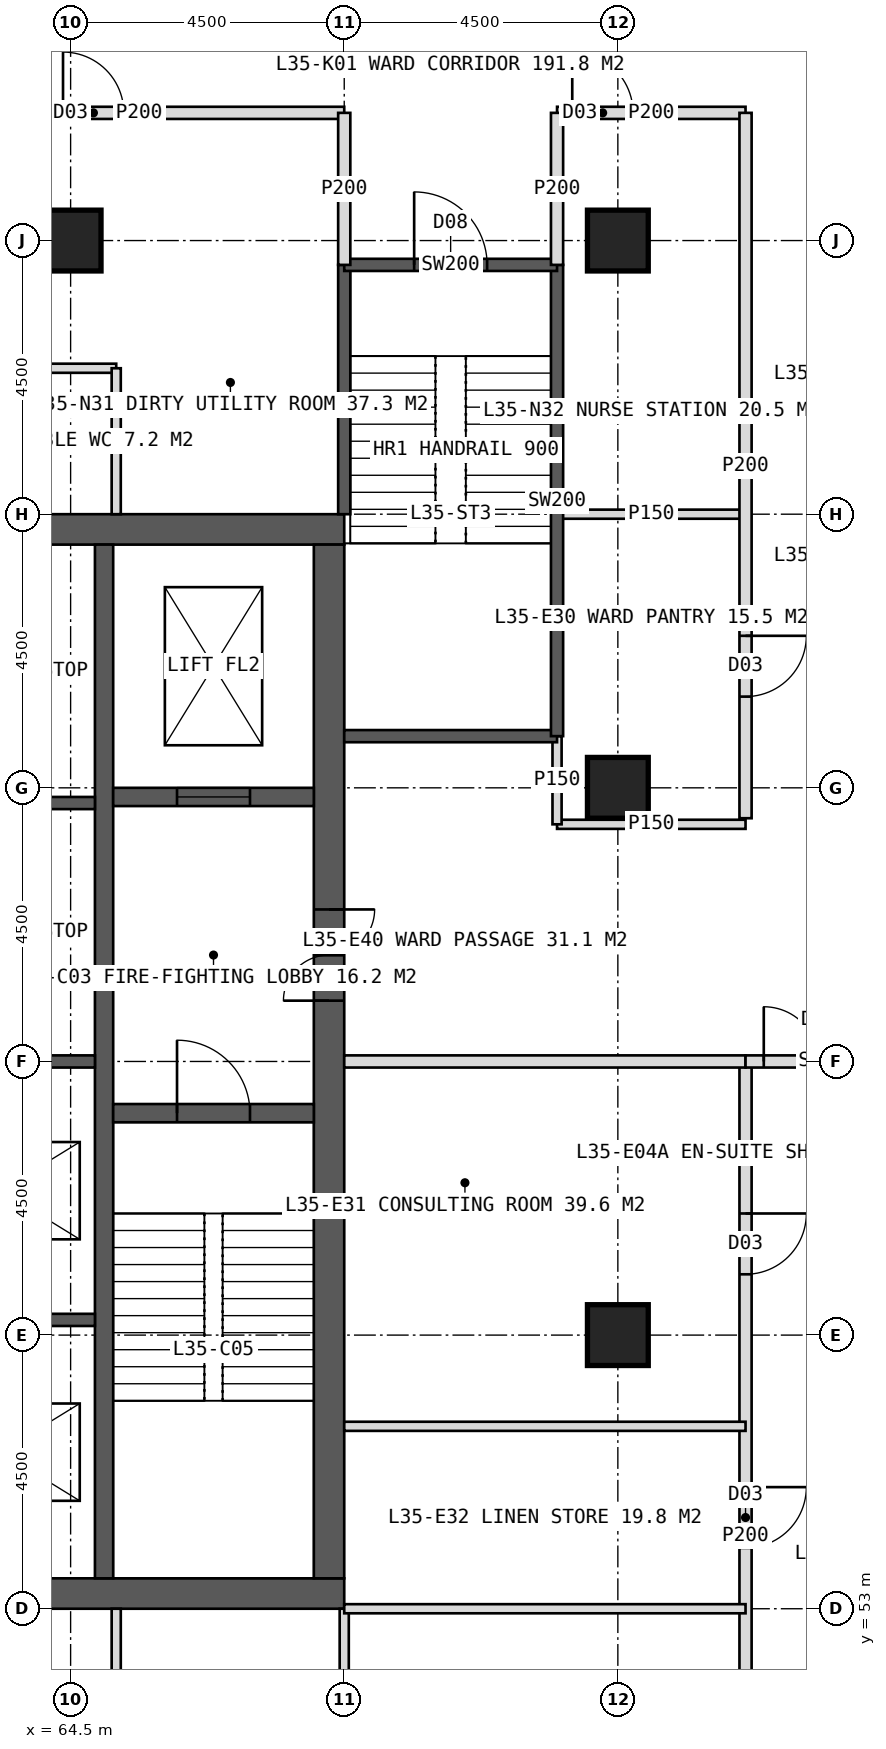
"""IFC4 building model, lengths in metres.
Left out: names, types, materials, properties, quantities, classifications, styles, units other than length and angle.
Written with IfcOpenShell. Run it as: python <this file> out.ifc"""

import sys

from ifc_helpers import new_model, si_unit, direction, frame, frame_2d, origin, origin_2d, place, context, subcontext, project, spatial, rectangle, hollow_rectangle, extrude, element, fill, save


model = new_model("IFC4")
c1 = context("Model", 3, precision=1e-05, world=origin(), true_north=direction((0.0, 1.0)))
c2 = subcontext(c1, "Body", "Model", "MODEL_VIEW")
j1 = project(units=[si_unit("LENGTHUNIT", "METRE"), si_unit("PLANEANGLEUNIT", "RADIAN")], contexts=[c1])
p1 = place(None, origin())
s1 = spatial("IfcSite", under=j1, at=p1, CompositionType="ELEMENT")
p2 = place(p1, origin())
s2 = spatial("IfcBuilding", under=s1, at=p2, CompositionType="ELEMENT")
p3 = place(p2, frame((0.0, 0.0, 148.0)))
s3 = spatial("IfcBuildingStorey", under=s2, at=p3, CompositionType="ELEMENT", Elevation=148.0)
p4 = place(p3, frame((51.0, 70.75, 0.0), z_axis=(0.0, 0.0, 1.0), x_axis=(1.0, 0.0, 0.0)))
e1 = element("IfcWall", 1, at=p4, inside=s3, PredefinedType="SHEAR", context=c2, shape_type="SweptSolid", body=[
    extrude(rectangle(XDim=18.0, YDim=0.5, at=frame_2d((9.0, 0.0))), origin(), (0.0, 0.0, 1.0), 4.0),
])
p5 = place(p4, frame((8.1, 0.0, 0.0)))
e2 = element("IfcOpeningElement", 2, at=p5, cuts=e1, PredefinedType="OPENING", context=c2, shape_type="SweptSolid", body=[
    extrude(rectangle(XDim=1.8, YDim=2.2, at=frame_2d((0.9, 1.1))), frame((0.0, 0.26, 0.0), z_axis=(0.0, -1.0, 0.0), x_axis=(1.0, 0.0, 0.0)), (0.0, 0.0, 1.0), 0.52),
])
p6 = place(p3, frame((51.0, 53.25, 0.0), z_axis=(0.0, 0.0, 1.0), x_axis=(1.0, 0.0, 0.0)))
e3 = element("IfcWall", 3, at=p6, inside=s3, PredefinedType="SHEAR", context=c2, shape_type="SweptSolid", body=[
    extrude(rectangle(XDim=18.0, YDim=0.5, at=frame_2d((9.0, 0.0))), origin(), (0.0, 0.0, 1.0), 4.0),
])
p7 = place(p6, frame((8.1, 0.0, 0.0)))
e4 = element("IfcOpeningElement", 4, at=p7, cuts=e3, PredefinedType="OPENING", context=c2, shape_type="SweptSolid", body=[
    extrude(rectangle(XDim=1.8, YDim=2.2, at=frame_2d((0.9, 1.1))), frame((0.0, 0.26, 0.0), z_axis=(0.0, -1.0, 0.0), x_axis=(1.0, 0.0, 0.0)), (0.0, 0.0, 1.0), 0.52),
])
p8 = place(p3, frame((68.75, 53.5, 0.0), z_axis=(0.0, 0.0, 1.0), x_axis=(0.0, 1.0, 0.0)))
e5 = element("IfcWall", 5, at=p8, inside=s3, PredefinedType="SHEAR", context=c2, shape_type="SweptSolid", body=[
    extrude(rectangle(XDim=17.0, YDim=0.5, at=frame_2d((8.5, 0.0))), origin(), (0.0, 0.0, 1.0), 4.0),
])
p9 = place(p8, frame((9.5, 0.0, 0.0)))
e6 = element("IfcOpeningElement", 6, at=p9, cuts=e5, PredefinedType="OPENING", context=c2, shape_type="SweptSolid", body=[
    extrude(rectangle(XDim=1.5, YDim=2.2, at=frame_2d((0.75, 1.1))), frame((0.0, 0.26, 0.0), z_axis=(0.0, -1.0, 0.0), x_axis=(1.0, 0.0, 0.0)), (0.0, 0.0, 1.0), 0.52),
])
p10 = place(p3, frame((65.05, 53.5, 0.0), z_axis=(0.0, 0.0, 1.0), x_axis=(0.0, 1.0, 0.0)))
e7 = element("IfcWall", 7, at=p10, inside=s3, PredefinedType="SHEAR", context=c2, shape_type="SweptSolid", body=[
    extrude(rectangle(XDim=17.0, YDim=0.3, at=frame_2d((8.5, 0.0))), origin(), (0.0, 0.0, 1.0), 4.0),
])
for number, where, z_axis, x_axis in (
    (8, (61.85, 57.75, 0.0), (0.0, 0.0, 1.0), (1.0, 0.0, 0.0)),
    (9, (61.85, 62.0, 0.0), (0.0, 0.0, 1.0), (1.0, 0.0, 0.0)),
    (10, (61.85, 66.25, 0.0), (0.0, 0.0, 1.0), (1.0, 0.0, 0.0)),
):
    element("IfcWall", number, at=place(p3, frame(where, z_axis=z_axis, x_axis=x_axis)), inside=s3, PredefinedType="SHEAR", context=c2, shape_type="SweptSolid", body=[
        extrude(rectangle(XDim=3.05, YDim=0.2, at=frame_2d((1.525, 0.0))), origin(), (0.0, 0.0, 1.0), 4.0),
    ])
p11 = place(p3, frame((65.2, 61.15, 0.0), z_axis=(0.0, 0.0, 1.0), x_axis=(1.0, 0.0, 0.0)))
e11 = element("IfcWall", 11, at=p11, inside=s3, PredefinedType="SHEAR", context=c2, shape_type="SweptSolid", body=[
    extrude(rectangle(XDim=3.3, YDim=0.3, at=frame_2d((1.65, 0.0))), origin(), (0.0, 0.0, 1.0), 4.0),
])
p12 = place(p11, frame((1.05, 0.0, 0.0)))
e12 = element("IfcOpeningElement", 12, at=p12, cuts=e11, PredefinedType="OPENING", context=c2, shape_type="SweptSolid", body=[
    extrude(rectangle(XDim=1.2, YDim=2.1, at=frame_2d((0.6, 1.05))), frame((0.0, 0.16, 0.0), z_axis=(0.0, -1.0, 0.0), x_axis=(1.0, 0.0, 0.0)), (0.0, 0.0, 1.0), 0.32),
])
p13 = place(p3, frame((65.2, 66.35, 0.0), z_axis=(0.0, 0.0, 1.0), x_axis=(1.0, 0.0, 0.0)))
e13 = element("IfcWall", 13, at=p13, inside=s3, PredefinedType="SHEAR", context=c2, shape_type="SweptSolid", body=[
    extrude(rectangle(XDim=3.3, YDim=0.3, at=frame_2d((1.65, 0.0))), origin(), (0.0, 0.0, 1.0), 4.0),
])
p14 = place(p13, frame((1.05, 0.0, 0.0)))
e14 = element("IfcOpeningElement", 14, at=p14, cuts=e13, PredefinedType="OPENING", context=c2, shape_type="SweptSolid", body=[
    extrude(rectangle(XDim=1.2, YDim=2.2, at=frame_2d((0.6, 1.1))), frame((0.0, 0.16, 0.0), z_axis=(0.0, -1.0, 0.0), x_axis=(1.0, 0.0, 0.0)), (0.0, 0.0, 1.0), 0.32),
])
for number, where, z_axis, x_axis in (
    (15, (73.5, 75.5, 0.0), (0.0, 0.0, 1.0), (1.0, 0.0, 0.0)),
    (16, (64.5, 75.5, 0.0), (0.0, 0.0, 1.0), (1.0, 0.0, 0.0)),
    (17, (73.5, 57.5, 0.0), (0.0, 0.0, 1.0), (1.0, 0.0, 0.0)),
    (18, (73.5, 66.5, 0.0), (0.0, 0.0, 1.0), (1.0, 0.0, 0.0)),
):
    element("IfcColumn", number, at=place(p3, frame(where, z_axis=z_axis, x_axis=x_axis)), inside=s3, PredefinedType="COLUMN", context=c2, shape_type="SweptSolid", body=[
        extrude(hollow_rectangle(XDim=1.0, YDim=1.0, WallThickness=0.1, at=origin_2d()), origin(), (0.0, 0.0, 1.0), 4.0),
    ])
p15 = place(p3, frame((62.25, 77.6, 0.0), z_axis=(0.0, 0.0, 1.0), x_axis=(1.0, 0.0, 0.0)))
e19 = element("IfcWall", 19, at=p15, inside=s3, PredefinedType="PARTITIONING", context=c2, shape_type="SweptSolid", body=[
    extrude(rectangle(XDim=6.75, YDim=0.2, at=frame_2d((3.375, 0.0))), origin(), (0.0, 0.0, 1.0), 3.75),
])
p16 = place(p15, frame((2.125, 0.0, 0.0)))
e20 = element("IfcOpeningElement", 20, at=p16, cuts=e19, PredefinedType="OPENING", context=c2, shape_type="SweptSolid", body=[
    extrude(rectangle(XDim=1.0, YDim=2.1, at=frame_2d((0.5, 1.05))), frame((0.0, 0.11, 0.0), z_axis=(0.0, -1.0, 0.0), x_axis=(1.0, 0.0, 0.0)), (0.0, 0.0, 1.0), 0.22),
])
p17 = place(p3, frame((72.5, 77.6, 0.0), z_axis=(0.0, 0.0, 1.0), x_axis=(1.0, 0.0, 0.0)))
e21 = element("IfcWall", 21, at=p17, inside=s3, PredefinedType="PARTITIONING", context=c2, shape_type="SweptSolid", body=[
    extrude(rectangle(XDim=3.1, YDim=0.2, at=frame_2d((1.55, 0.0))), origin(), (0.0, 0.0, 1.0), 3.75),
])
p18 = place(p17, frame((0.25, 0.0, 0.0)))
e22 = element("IfcOpeningElement", 22, at=p18, cuts=e21, PredefinedType="OPENING", context=c2, shape_type="SweptSolid", body=[
    extrude(rectangle(XDim=1.0, YDim=2.1, at=frame_2d((0.5, 1.05))), frame((0.0, 0.11, 0.0), z_axis=(0.0, -1.0, 0.0), x_axis=(1.0, 0.0, 0.0)), (0.0, 0.0, 1.0), 0.22),
])
p19 = place(p3, frame((62.25, 73.4, 0.0), z_axis=(0.0, 0.0, 1.0), x_axis=(1.0, 0.0, 0.0)))
e23 = element("IfcWall", 23, at=p19, inside=s3, PredefinedType="PARTITIONING", context=c2, shape_type="SweptSolid", body=[
    extrude(rectangle(XDim=3.0, YDim=0.15, at=frame_2d((1.5, 0.0))), origin(), (0.0, 0.0, 1.0), 3.75),
])
p20 = place(p3, frame((65.25, 71.0, 0.0), z_axis=(0.0, 0.0, 1.0), x_axis=(0.0, 1.0, 0.0)))
e24 = element("IfcWall", 24, at=p20, inside=s3, PredefinedType="PARTITIONING", context=c2, shape_type="SweptSolid", body=[
    extrude(rectangle(XDim=2.4, YDim=0.15, at=frame_2d((1.2, 0.0))), origin(), (0.0, 0.0, 1.0), 3.75),
])
p21 = place(p3, frame((69.0, 53.0, 0.0), z_axis=(0.0, 0.0, 1.0), x_axis=(0.0, -1.0, 0.0)))
e25 = element("IfcWall", 25, at=p21, inside=s3, PredefinedType="PARTITIONING", context=c2, shape_type="SweptSolid", body=[
    extrude(rectangle(XDim=6.6, YDim=0.15, at=frame_2d((3.3, 0.0))), origin(), (0.0, 0.0, 1.0), 3.75),
])
p22 = place(p3, frame((65.25, 53.0, 0.0), z_axis=(0.0, 0.0, 1.0), x_axis=(0.0, -1.0, 0.0)))
e26 = element("IfcWall", 26, at=p22, inside=s3, PredefinedType="PARTITIONING", context=c2, shape_type="SweptSolid", body=[
    extrude(rectangle(XDim=2.4, YDim=0.15, at=frame_2d((1.2, 0.0))), origin(), (0.0, 0.0, 1.0), 3.75),
])
p23 = place(p3, frame((72.5, 71.0, 0.0), z_axis=(0.0, 0.0, 1.0), x_axis=(1.0, 0.0, 0.0)))
e27 = element("IfcWall", 27, at=p23, inside=s3, PredefinedType="PARTITIONING", context=c2, shape_type="SweptSolid", body=[
    extrude(rectangle(XDim=3.1, YDim=0.15, at=frame_2d((1.55, 0.0))), origin(), (0.0, 0.0, 1.0), 3.75),
])
p24 = place(p3, frame((75.6, 77.6, 0.0), z_axis=(0.0, 0.0, 1.0), x_axis=(0.0, -1.0, 0.0)))
e28 = element("IfcWall", 28, at=p24, inside=s3, PredefinedType="PARTITIONING", context=c2, shape_type="SweptSolid", body=[
    extrude(rectangle(XDim=11.6, YDim=0.2, at=frame_2d((5.8, 0.0))), origin(), (0.0, 0.0, 1.0), 3.75),
])
p25 = place(p24, frame((8.6, 0.0, 0.0)))
e29 = element("IfcOpeningElement", 29, at=p25, cuts=e28, PredefinedType="OPENING", context=c2, shape_type="SweptSolid", body=[
    extrude(rectangle(XDim=1.0, YDim=2.1, at=frame_2d((0.5, 1.05))), frame((0.0, 0.11, 0.0), z_axis=(0.0, -1.0, 0.0), x_axis=(1.0, 0.0, 0.0)), (0.0, 0.0, 1.0), 0.22),
])
p26 = place(p3, frame((75.6, 62.0, 0.0), z_axis=(0.0, 0.0, 1.0), x_axis=(0.0, -1.0, 0.0)))
e30 = element("IfcWall", 30, at=p26, inside=s3, PredefinedType="PARTITIONING", context=c2, shape_type="SweptSolid", body=[
    extrude(rectangle(XDim=15.6, YDim=0.2, at=frame_2d((7.8, 0.0))), origin(), (0.0, 0.0, 1.0), 3.75),
])
p27 = place(p26, frame((2.5, 0.0, 0.0)))
e31 = element("IfcOpeningElement", 31, at=p27, cuts=e30, PredefinedType="OPENING", context=c2, shape_type="SweptSolid", body=[
    extrude(rectangle(XDim=1.0, YDim=2.1, at=frame_2d((0.5, 1.05))), frame((0.0, 0.11, 0.0), z_axis=(0.0, -1.0, 0.0), x_axis=(1.0, 0.0, 0.0)), (0.0, 0.0, 1.0), 0.22),
])
p28 = place(p26, frame((7.0, 0.0, 0.0)))
e32 = element("IfcOpeningElement", 32, at=p28, cuts=e30, PredefinedType="OPENING", context=c2, shape_type="SweptSolid", body=[
    extrude(rectangle(XDim=1.0, YDim=2.1, at=frame_2d((0.5, 1.05))), frame((0.0, 0.11, 0.0), z_axis=(0.0, -1.0, 0.0), x_axis=(1.0, 0.0, 0.0)), (0.0, 0.0, 1.0), 0.22),
])
p29 = place(p26, frame((11.8, 0.0, 0.0)))
e33 = element("IfcOpeningElement", 33, at=p29, cuts=e30, PredefinedType="OPENING", context=c2, shape_type="SweptSolid", body=[
    extrude(rectangle(XDim=1.0, YDim=2.1, at=frame_2d((0.5, 1.05))), frame((0.0, 0.11, 0.0), z_axis=(0.0, -1.0, 0.0), x_axis=(1.0, 0.0, 0.0)), (0.0, 0.0, 1.0), 0.22),
])
p30 = place(p3, frame((72.5, 65.9, 0.0), z_axis=(0.0, 0.0, 1.0), x_axis=(1.0, 0.0, 0.0)))
e34 = element("IfcWall", 34, at=p30, inside=s3, PredefinedType="PARTITIONING", context=c2, shape_type="SweptSolid", body=[
    extrude(rectangle(XDim=3.1, YDim=0.15, at=frame_2d((1.55, 0.0))), origin(), (0.0, 0.0, 1.0), 3.75),
])
p31 = place(p3, frame((69.0, 62.0, 0.0), z_axis=(0.0, 0.0, 1.0), x_axis=(1.0, 0.0, 0.0)))
e35 = element("IfcWall", 35, at=p31, inside=s3, PredefinedType="SOLIDWALL", context=c2, shape_type="SweptSolid", body=[
    extrude(rectangle(XDim=6.6, YDim=0.2, at=frame_2d((3.3, 0.0))), origin(), (0.0, 0.0, 1.0), 2.95),
])
for number, where, z_axis, x_axis in (
    (36, (69.0, 56.0, 0.0), (0.0, 0.0, 1.0), (1.0, 0.0, 0.0)),
    (37, (69.0, 53.0, 0.0), (0.0, 0.0, 1.0), (1.0, 0.0, 0.0)),
):
    element("IfcWall", number, at=place(p3, frame(where, z_axis=z_axis, x_axis=x_axis)), inside=s3, PredefinedType="PARTITIONING", context=c2, shape_type="SweptSolid", body=[
        extrude(rectangle(XDim=6.6, YDim=0.15, at=frame_2d((3.3, 0.0))), origin(), (0.0, 0.0, 1.0), 3.75),
    ])
p32 = place(p3, frame((75.6, 62.0, 0.0), z_axis=(0.0, 0.0, 1.0), x_axis=(1.0, 0.0, 0.0)))
e38 = element("IfcWall", 38, at=p32, inside=s3, PredefinedType="SOLIDWALL", context=c2, shape_type="SweptSolid", body=[
    extrude(rectangle(XDim=2.7, YDim=0.2, at=frame_2d((1.35, 0.0))), origin(), (0.0, 0.0, 1.0), 2.95),
])
p33 = place(p32, frame((0.3, 0.0, 0.0)))
e39 = element("IfcOpeningElement", 39, at=p33, cuts=e38, PredefinedType="OPENING", context=c2, shape_type="SweptSolid", body=[
    extrude(rectangle(XDim=1.8, YDim=2.2, at=frame_2d((0.9, 1.1))), frame((0.0, 0.11, 0.0), z_axis=(0.0, -1.0, 0.0), x_axis=(1.0, 0.0, 0.0)), (0.0, 0.0, 1.0), 0.22),
])
p34 = place(p3, frame((72.5, 65.9, 0.0), z_axis=(0.0, 0.0, 1.0), x_axis=(0.0, 1.0, 0.0)))
e40 = element("IfcWall", 40, at=p34, inside=s3, PredefinedType="PARTITIONING", context=c2, shape_type="SweptSolid", body=[
    extrude(rectangle(XDim=1.45, YDim=0.15, at=frame_2d((0.725, 0.0))), origin(), (0.0, 0.0, 1.0), 3.75),
])
p35 = place(p3, frame((69.0, 71.0, 0.0), z_axis=(0.0, 0.0, 1.0), x_axis=(0.0, 1.0, 0.0)))
e41 = element("IfcWall", 41, at=p35, inside=s3, PredefinedType="SOLIDWALL", context=c2, shape_type="SweptSolid", body=[
    extrude(rectangle(XDim=4.1, YDim=0.2, at=frame_2d((2.05, 0.0))), origin(), (0.0, 0.0, 1.0), 3.75),
])
p36 = place(p3, frame((69.0, 67.35, 0.0), z_axis=(0.0, 0.0, 1.0), x_axis=(1.0, 0.0, 0.0)))
e42 = element("IfcWall", 42, at=p36, inside=s3, PredefinedType="SOLIDWALL", context=c2, shape_type="SweptSolid", body=[
    extrude(rectangle(XDim=3.5, YDim=0.2, at=frame_2d((1.75, 0.0))), origin(), (0.0, 0.0, 1.0), 3.75),
])
p37 = place(p3, frame((72.5, 67.35, 0.0), z_axis=(0.0, 0.0, 1.0), x_axis=(0.0, 1.0, 0.0)))
e43 = element("IfcWall", 43, at=p37, inside=s3, PredefinedType="SOLIDWALL", context=c2, shape_type="SweptSolid", body=[
    extrude(rectangle(XDim=7.75, YDim=0.2, at=frame_2d((3.875, 0.0))), origin(), (0.0, 0.0, 1.0), 3.75),
])
p38 = place(p3, frame((69.0, 75.1, 0.0), z_axis=(0.0, 0.0, 1.0), x_axis=(1.0, 0.0, 0.0)))
e44 = element("IfcWall", 44, at=p38, inside=s3, PredefinedType="SOLIDWALL", context=c2, shape_type="SweptSolid", body=[
    extrude(rectangle(XDim=3.5, YDim=0.2, at=frame_2d((1.75, 0.0))), origin(), (0.0, 0.0, 1.0), 3.75),
])
p39 = place(p38, frame((1.15, 0.0, 0.0)))
e45 = element("IfcOpeningElement", 45, at=p39, cuts=e44, PredefinedType="OPENING", context=c2, shape_type="SweptSolid", body=[
    extrude(rectangle(XDim=1.2, YDim=2.1, at=frame_2d((0.6, 1.05))), frame((0.0, 0.11, 0.0), z_axis=(0.0, -1.0, 0.0), x_axis=(1.0, 0.0, 0.0)), (0.0, 0.0, 1.0), 0.22),
])
for number, where, z_axis, x_axis in (
    (46, (69.0, 75.1, 0.0), (0.0, 0.0, 1.0), (0.0, 1.0, 0.0)),
    (47, (72.5, 75.1, 0.0), (0.0, 0.0, 1.0), (0.0, 1.0, 0.0)),
):
    element("IfcWall", number, at=place(p3, frame(where, z_axis=z_axis, x_axis=x_axis)), inside=s3, PredefinedType="PARTITIONING", context=c2, shape_type="SweptSolid", body=[
        extrude(rectangle(XDim=2.5, YDim=0.2, at=frame_2d((1.25, 0.0))), origin(), (0.0, 0.0, 1.0), 3.75),
    ])
p40 = place(p16, origin())
e48 = element("IfcDoor", 48, at=p40, inside=s3, OperationType="SINGLE_SWING_LEFT", PredefinedType="DOOR", context=c2, shape_type="SweptSolid", body=[
    extrude(rectangle(XDim=1.0, YDim=2.1, at=frame_2d((0.5, 1.05))), frame((0.0, 0.025, 0.0), z_axis=(0.0, -1.0, 0.0), x_axis=(1.0, 0.0, 0.0)), (0.0, 0.0, 1.0), 0.05),
])
fill(e20, e48)
p41 = place(p18, origin())
e49 = element("IfcDoor", 49, at=p41, inside=s3, OperationType="SINGLE_SWING_LEFT", PredefinedType="DOOR", context=c2, shape_type="SweptSolid", body=[
    extrude(rectangle(XDim=1.0, YDim=2.1, at=frame_2d((0.5, 1.05))), frame((0.0, 0.025, 0.0), z_axis=(0.0, -1.0, 0.0), x_axis=(1.0, 0.0, 0.0)), (0.0, 0.0, 1.0), 0.05),
])
fill(e22, e49)
p42 = place(p25, origin())
e50 = element("IfcDoor", 50, at=p42, inside=s3, OperationType="SINGLE_SWING_LEFT", PredefinedType="DOOR", context=c2, shape_type="SweptSolid", body=[
    extrude(rectangle(XDim=1.0, YDim=2.1, at=frame_2d((0.5, 1.05))), frame((0.0, 0.025, 0.0), z_axis=(0.0, -1.0, 0.0), x_axis=(1.0, 0.0, 0.0)), (0.0, 0.0, 1.0), 0.05),
])
fill(e29, e50)
p43 = place(p27, origin())
e51 = element("IfcDoor", 51, at=p43, inside=s3, OperationType="SINGLE_SWING_LEFT", PredefinedType="DOOR", context=c2, shape_type="SweptSolid", body=[
    extrude(rectangle(XDim=1.0, YDim=2.1, at=frame_2d((0.5, 1.05))), frame((0.0, 0.025, 0.0), z_axis=(0.0, -1.0, 0.0), x_axis=(1.0, 0.0, 0.0)), (0.0, 0.0, 1.0), 0.05),
])
fill(e31, e51)
p44 = place(p28, origin())
e52 = element("IfcDoor", 52, at=p44, inside=s3, OperationType="SINGLE_SWING_LEFT", PredefinedType="DOOR", context=c2, shape_type="SweptSolid", body=[
    extrude(rectangle(XDim=1.0, YDim=2.1, at=frame_2d((0.5, 1.05))), frame((0.0, 0.025, 0.0), z_axis=(0.0, -1.0, 0.0), x_axis=(1.0, 0.0, 0.0)), (0.0, 0.0, 1.0), 0.05),
])
fill(e32, e52)
p45 = place(p33, origin())
e53 = element("IfcDoor", 53, at=p45, inside=s3, OperationType="DOUBLE_DOOR_DOUBLE_SWING", PredefinedType="DOOR", context=c2, shape_type="SweptSolid", body=[
    extrude(rectangle(XDim=1.8, YDim=2.2, at=frame_2d((0.9, 1.1))), frame((0.0, 0.025, 0.0), z_axis=(0.0, -1.0, 0.0), x_axis=(1.0, 0.0, 0.0)), (0.0, 0.0, 1.0), 0.05),
])
fill(e39, e53)
p46 = place(p9, origin())
e54 = element("IfcDoor", 54, at=p46, inside=s3, OperationType="DOUBLE_DOOR_SINGLE_SWING", PredefinedType="DOOR", context=c2, shape_type="SweptSolid", body=[
    extrude(rectangle(XDim=1.5, YDim=2.2, at=frame_2d((0.75, 1.1))), frame((0.0, 0.025, 0.0), z_axis=(0.0, -1.0, 0.0), x_axis=(1.0, 0.0, 0.0)), (0.0, 0.0, 1.0), 0.05),
])
fill(e6, e54)
p47 = place(p12, origin())
e55 = element("IfcDoor", 55, at=p47, inside=s3, OperationType="SINGLE_SWING_LEFT", PredefinedType="DOOR", context=c2, shape_type="SweptSolid", body=[
    extrude(rectangle(XDim=1.2, YDim=2.1, at=frame_2d((0.6, 1.05))), frame((0.0, 0.025, 0.0), z_axis=(0.0, -1.0, 0.0), x_axis=(1.0, 0.0, 0.0)), (0.0, 0.0, 1.0), 0.05),
])
fill(e12, e55)
p48 = place(p14, origin())
e56 = element("IfcDoor", 56, at=p48, inside=s3, OperationType="SLIDING_TO_LEFT", PredefinedType="DOOR", context=c2, shape_type="SweptSolid", body=[
    extrude(rectangle(XDim=1.2, YDim=2.2, at=frame_2d((0.6, 1.1))), frame((0.0, 0.025, 0.0), z_axis=(0.0, -1.0, 0.0), x_axis=(1.0, 0.0, 0.0)), (0.0, 0.0, 1.0), 0.05),
])
fill(e14, e56)
p49 = place(p39, origin())
e57 = element("IfcDoor", 57, at=p49, inside=s3, OperationType="SINGLE_SWING_LEFT", PredefinedType="DOOR", context=c2, shape_type="SweptSolid", body=[
    extrude(rectangle(XDim=1.2, YDim=2.1, at=frame_2d((0.6, 1.05))), frame((0.0, 0.025, 0.0), z_axis=(0.0, -1.0, 0.0), x_axis=(1.0, 0.0, 0.0)), (0.0, 0.0, 1.0), 0.05),
])
fill(e45, e57)
save(model, sys.argv[1])
